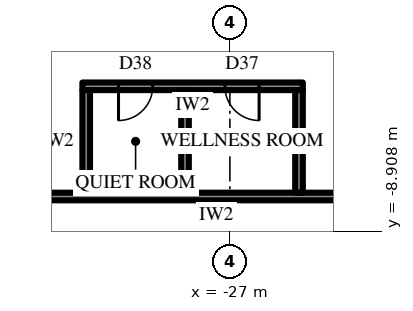
"""IFC4 building model, lengths in metres.
Left out: names, types, materials, properties, quantities, classifications, styles, units other than length and angle.
Written with IfcOpenShell. Run it as: python <this file> out.ifc"""

import sys

from ifc_helpers import new_model, si_unit, direction, frame, frame_2d, origin, place, context, subcontext, project, spatial, rectangle, extrude, element, fill, save


model = new_model("IFC4")
c1 = context("Model", 3, precision=1e-05, world=origin(), true_north=direction((0.0, 1.0)))
c2 = subcontext(c1, "Body", "Model", "MODEL_VIEW")
j1 = project(units=[si_unit("LENGTHUNIT", "METRE"), si_unit("PLANEANGLEUNIT", "RADIAN")], contexts=[c1])
p1 = place(None, origin())
s1 = spatial("IfcSite", under=j1, at=p1, CompositionType="ELEMENT")
p2 = place(p1, origin())
s2 = spatial("IfcBuilding", under=s1, at=p2, CompositionType="ELEMENT")
p3 = place(p2, frame((0.0, 0.0, 99.1)))
s3 = spatial("IfcBuildingStorey", under=s2, at=p3, CompositionType="ELEMENT", Elevation=99.1)
p4 = place(p3, frame((-37.398, -2.925, 0.0), z_axis=(0.0, 0.0, 1.0), x_axis=(0.499999163675, -0.866025886636, 0.0)))
e1 = element("IfcWall", 1, at=p4, inside=s3, PredefinedType="SOLIDWALL", context=c2, shape_type="SweptSolid", body=[
    extrude(rectangle(XDim=32.332, YDim=0.3, at=frame_2d((16.166, 0.0))), origin(), (0.0, 0.0, 1.0), 2.7),
])
p5 = place(p4, frame((1.319, 0.0, 0.6)))
e2 = element("IfcOpeningElement", 2, at=p5, cuts=e1, PredefinedType="OPENING", context=c2, shape_type="SweptSolid", body=[
    extrude(rectangle(XDim=2.75, YDim=1.85, at=frame_2d((1.375, 0.925))), frame((0.0, 0.16, 0.0), z_axis=(0.0, -1.0, 0.0), x_axis=(1.0, 0.0, 0.0)), (0.0, 0.0, 1.0), 0.32),
])
p6 = place(p4, frame((6.708, 0.0, 0.6)))
e3 = element("IfcOpeningElement", 3, at=p6, cuts=e1, PredefinedType="OPENING", context=c2, shape_type="SweptSolid", body=[
    extrude(rectangle(XDim=2.75, YDim=1.85, at=frame_2d((1.375, 0.925))), frame((0.0, 0.16, 0.0), z_axis=(0.0, -1.0, 0.0), x_axis=(1.0, 0.0, 0.0)), (0.0, 0.0, 1.0), 0.32),
])
p7 = place(p4, frame((12.872, 0.0, 0.0)))
e4 = element("IfcOpeningElement", 4, at=p7, cuts=e1, PredefinedType="OPENING", context=c2, shape_type="SweptSolid", body=[
    extrude(rectangle(XDim=1.2, YDim=2.4, at=frame_2d((0.6, 1.2))), frame((0.0, 0.16, 0.0), z_axis=(0.0, -1.0, 0.0), x_axis=(1.0, 0.0, 0.0)), (0.0, 0.0, 1.0), 0.32),
])
p8 = place(p4, frame((17.485, 0.0, 0.6)))
e5 = element("IfcOpeningElement", 5, at=p8, cuts=e1, PredefinedType="OPENING", context=c2, shape_type="SweptSolid", body=[
    extrude(rectangle(XDim=2.75, YDim=1.85, at=frame_2d((1.375, 0.925))), frame((0.0, 0.16, 0.0), z_axis=(0.0, -1.0, 0.0), x_axis=(1.0, 0.0, 0.0)), (0.0, 0.0, 1.0), 0.32),
])
p9 = place(p4, frame((22.874, 0.0, 0.6)))
e6 = element("IfcOpeningElement", 6, at=p9, cuts=e1, PredefinedType="OPENING", context=c2, shape_type="SweptSolid", body=[
    extrude(rectangle(XDim=2.75, YDim=1.85, at=frame_2d((1.375, 0.925))), frame((0.0, 0.16, 0.0), z_axis=(0.0, -1.0, 0.0), x_axis=(1.0, 0.0, 0.0)), (0.0, 0.0, 1.0), 0.32),
])
p10 = place(p4, frame((28.262, 0.0, 0.6)))
e7 = element("IfcOpeningElement", 7, at=p10, cuts=e1, PredefinedType="OPENING", context=c2, shape_type="SweptSolid", body=[
    extrude(rectangle(XDim=2.75, YDim=1.85, at=frame_2d((1.375, 0.925))), frame((0.0, 0.16, 0.0), z_axis=(0.0, -1.0, 0.0), x_axis=(1.0, 0.0, 0.0)), (0.0, 0.0, 1.0), 0.32),
])
p11 = place(p3, frame((-21.1, -8.0, 0.0), z_axis=(0.0, 0.0, 1.0), x_axis=(-1.0, 0.0, 0.0)))
e8 = element("IfcWall", 8, at=p11, inside=s3, PredefinedType="PARTITIONING", context=c2, shape_type="SweptSolid", body=[
    extrude(rectangle(XDim=12.511, YDim=0.2, at=frame_2d((6.255, 0.0))), origin(), (0.0, 0.0, 1.0), 4.0),
])
p12 = place(p11, frame((0.751, 0.0, 0.0)))
e9 = element("IfcOpeningElement", 9, at=p12, cuts=e8, PredefinedType="OPENING", context=c2, shape_type="SweptSolid", body=[
    extrude(rectangle(XDim=1.0, YDim=2.2, at=frame_2d((0.5, 1.1))), frame((0.0, 0.11, 0.0), z_axis=(0.0, -1.0, 0.0), x_axis=(1.0, 0.0, 0.0)), (0.0, 0.0, 1.0), 0.22),
])
p13 = place(p3, frame((-25.081, -5.1, 0.0), z_axis=(0.0, 0.0, 1.0), x_axis=(-1.0, 0.0, 0.0)))
e10 = element("IfcWall", 10, at=p13, inside=s3, PredefinedType="PARTITIONING", context=c2, shape_type="SweptSolid", body=[
    extrude(rectangle(XDim=5.8, YDim=0.2, at=frame_2d((2.9, 0.0))), origin(), (0.0, 0.0, 1.0), 4.0),
])
p14 = place(p13, frame((1.15, 0.0, 0.0)))
e11 = element("IfcOpeningElement", 11, at=p14, cuts=e10, PredefinedType="OPENING", context=c2, shape_type="SweptSolid", body=[
    extrude(rectangle(XDim=0.9, YDim=2.2, at=frame_2d((0.45, 1.1))), frame((0.0, 0.11, 0.0), z_axis=(0.0, -1.0, 0.0), x_axis=(1.0, 0.0, 0.0)), (0.0, 0.0, 1.0), 0.22),
])
p15 = place(p13, frame((3.95, 0.0, 0.0)))
e12 = element("IfcOpeningElement", 12, at=p15, cuts=e10, PredefinedType="OPENING", context=c2, shape_type="SweptSolid", body=[
    extrude(rectangle(XDim=0.9, YDim=2.2, at=frame_2d((0.45, 1.1))), frame((0.0, 0.11, 0.0), z_axis=(0.0, -1.0, 0.0), x_axis=(1.0, 0.0, 0.0)), (0.0, 0.0, 1.0), 0.22),
])
for number, where, z_axis, x_axis in (
    (13, (-25.181, -7.9, 0.0), (0.0, 0.0, 1.0), (0.0, 1.0, 0.0)),
    (14, (-28.181, -7.9, 0.0), (0.0, 0.0, 1.0), (0.0, 1.0, 0.0)),
    (15, (-30.781, -7.9, 0.0), (0.0, 0.0, 1.0), (0.0, 1.0, 0.0)),
):
    element("IfcWall", number, at=place(p3, frame(where, z_axis=z_axis, x_axis=x_axis)), inside=s3, PredefinedType="PARTITIONING", context=c2, shape_type="SweptSolid", body=[
        extrude(rectangle(XDim=2.7, YDim=0.2, at=frame_2d((1.35, 0.0))), origin(), (0.0, 0.0, 1.0), 4.0),
    ])
p16 = place(p14, origin())
e16 = element("IfcDoor", 16, at=p16, inside=s3, OperationType="SINGLE_SWING_RIGHT", PredefinedType="DOOR", context=c2, shape_type="SweptSolid", body=[
    extrude(rectangle(XDim=0.9, YDim=2.2, at=frame_2d((0.45, 1.1))), frame((0.0, 0.025, 0.0), z_axis=(0.0, -1.0, 0.0), x_axis=(1.0, 0.0, 0.0)), (0.0, 0.0, 1.0), 0.05),
])
fill(e11, e16)
p17 = place(p15, origin())
e17 = element("IfcDoor", 17, at=p17, inside=s3, OperationType="SINGLE_SWING_LEFT", PredefinedType="DOOR", context=c2, shape_type="SweptSolid", body=[
    extrude(rectangle(XDim=0.9, YDim=2.2, at=frame_2d((0.45, 1.1))), frame((0.0, 0.025, 0.0), z_axis=(0.0, -1.0, 0.0), x_axis=(1.0, 0.0, 0.0)), (0.0, 0.0, 1.0), 0.05),
])
fill(e12, e17)
save(model, sys.argv[1])
